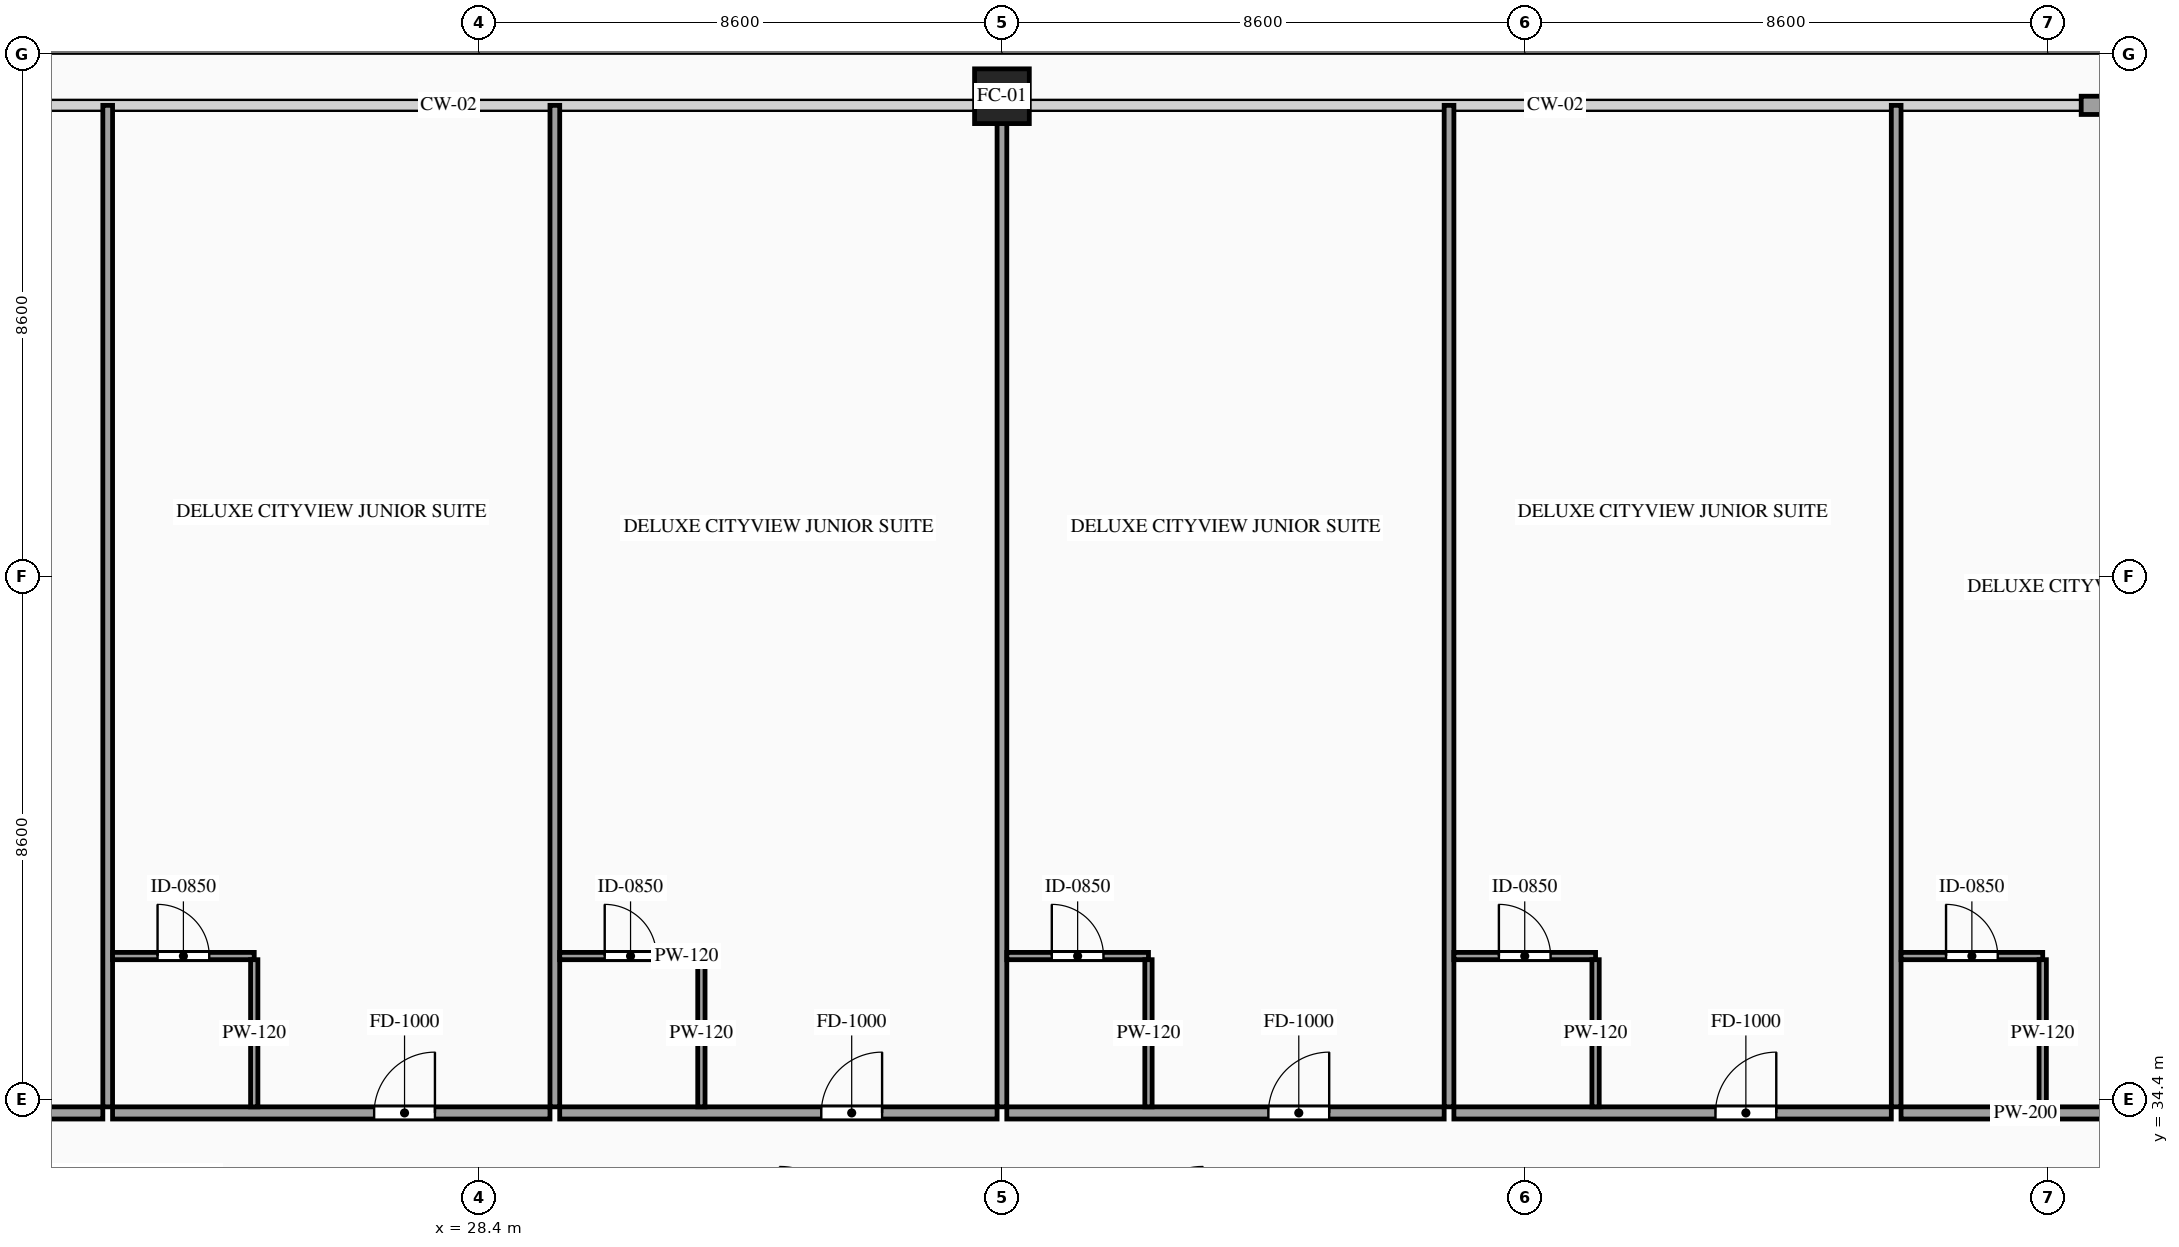
"""IFC4 building model, lengths in metres.
Left out: names, types, materials, properties, quantities, classifications, styles, units other than length and angle.
Written with IfcOpenShell. Run it as: python <this file> out.ifc"""

import sys

from ifc_helpers import new_model, si_unit, direction, frame, frame_2d, origin, origin_2d, place, context, subcontext, project, spatial, rectangle, hollow_rectangle, extrude, source, transform, mapped, element, fill, save


model = new_model("IFC4")
c1 = context("Model", 3, precision=1e-05, world=origin(), true_north=direction((0.0, 1.0)))
c2 = subcontext(c1, "Body", "Model", "MODEL_VIEW")
j1 = project(units=[si_unit("LENGTHUNIT", "METRE"), si_unit("PLANEANGLEUNIT", "RADIAN")], contexts=[c1])
p1 = place(None, origin())
s1 = spatial("IfcSite", under=j1, at=p1, CompositionType="ELEMENT")
p2 = place(p1, origin())
s2 = spatial("IfcBuilding", under=s1, at=p2, CompositionType="ELEMENT")
p3 = place(p2, frame((0.0, 0.0, 34.2)))
s3 = spatial("IfcBuildingStorey", under=s2, at=p3, CompositionType="ELEMENT", Elevation=34.2)
m1 = source(origin(), c2, "Body", "SweptSolid", [
    extrude(hollow_rectangle(XDim=0.9, YDim=0.9, WallThickness=0.042, at=origin_2d()), origin(), (0.0, 0.0, 1.0), 3.6),
])
p4 = place(p3, frame((37.0, 50.9, 0.0), z_axis=(0.0, 0.0, 1.0), x_axis=(1.0, 0.0, 0.0)))
e1 = element("IfcColumn", 1, at=p4, inside=s3, PredefinedType="COLUMN", context=c2, shape_type="MappedRepresentation", body=[
    mapped(m1, transform((0.0, 0.0, 0.0), scale=1.0)),
])
m2 = source(origin(), c2, "Body", "SweptSolid", [
    extrude(rectangle(XDim=2.85, YDim=0.3, at=frame_2d((1.425, 0.0))), origin(), (0.0, 0.0, 1.0), 2.775),
])
p5 = place(p3, frame((54.75, 50.75, 0.0), z_axis=(0.0, 0.0, 1.0), x_axis=(1.0, 0.0, 0.0)))
e2 = element("IfcWall", 2, at=p5, inside=s3, PredefinedType="SOLIDWALL", context=c2, shape_type="MappedRepresentation", body=[
    mapped(m2, transform((0.0, 0.0, 0.0), scale=1.0)),
])
p6 = place(p3, frame((14.94, 34.18, 0.0), z_axis=(0.0, 0.0, 1.0), x_axis=(1.0, 0.0, 0.0)))
e3 = element("IfcWall", 3, at=p6, inside=s3, PredefinedType="PARTITIONING", context=c2, shape_type="SweptSolid", body=[
    extrude(rectangle(XDim=7.273, YDim=0.2, at=frame_2d((3.636, 0.0))), origin(), (0.0, 0.0, 1.0), 3.38),
])
p7 = place(p6, frame((4.342, 0.0, 0.0)))
e4 = element("IfcOpeningElement", 4, at=p7, cuts=e3, PredefinedType="OPENING", context=c2, shape_type="SweptSolid", body=[
    extrude(rectangle(XDim=1.0, YDim=2.2, at=frame_2d((0.5, 1.1))), frame((0.0, 0.115, 0.0), z_axis=(0.0, -1.0, 0.0), x_axis=(1.0, 0.0, 0.0)), (0.0, 0.0, 1.0), 0.23),
])
m3 = source(origin(), c2, "Body", "SweptSolid", [
    extrude(rectangle(XDim=16.47, YDim=0.16, at=frame_2d((8.235, 0.0))), origin(), (0.0, 0.0, 1.0), 3.38),
])
p8 = place(p3, frame((22.293, 34.28, 0.0), z_axis=(0.0, 0.0, 1.0), x_axis=(0.0, 1.0, 0.0)))
e5 = element("IfcWall", 5, at=p8, inside=s3, PredefinedType="PARTITIONING", context=c2, shape_type="MappedRepresentation", body=[
    mapped(m3, transform((0.0, 0.0, 0.0), scale=1.0)),
])
p9 = place(p3, frame((22.373, 34.18, 0.0), z_axis=(0.0, 0.0, 1.0), x_axis=(1.0, 0.0, 0.0)))
e6 = element("IfcWall", 6, at=p9, inside=s3, PredefinedType="PARTITIONING", context=c2, shape_type="SweptSolid", body=[
    extrude(rectangle(XDim=7.194, YDim=0.2, at=frame_2d((3.597, 0.0))), origin(), (0.0, 0.0, 1.0), 3.38),
])
p10 = place(p9, frame((4.302, 0.0, 0.0)))
e7 = element("IfcOpeningElement", 7, at=p10, cuts=e6, PredefinedType="OPENING", context=c2, shape_type="SweptSolid", body=[
    extrude(rectangle(XDim=1.0, YDim=2.2, at=frame_2d((0.5, 1.1))), frame((0.0, 0.115, 0.0), z_axis=(0.0, -1.0, 0.0), x_axis=(1.0, 0.0, 0.0)), (0.0, 0.0, 1.0), 0.23),
])
p11 = place(p3, frame((29.647, 34.28, 0.0), z_axis=(0.0, 0.0, 1.0), x_axis=(0.0, 1.0, 0.0)))
e8 = element("IfcWall", 8, at=p11, inside=s3, PredefinedType="PARTITIONING", context=c2, shape_type="MappedRepresentation", body=[
    mapped(m3, transform((0.0, 0.0, 0.0), scale=1.0)),
])
p12 = place(p3, frame((22.373, 36.76, 0.0), z_axis=(0.0, 0.0, 1.0), x_axis=(1.0, 0.0, 0.0)))
e9 = element("IfcWall", 9, at=p12, inside=s3, PredefinedType="PARTITIONING", context=c2, shape_type="SweptSolid", body=[
    extrude(rectangle(XDim=2.33, YDim=0.12, at=frame_2d((1.165, 0.0))), origin(), (0.0, 0.0, 1.0), 3.38),
])
p13 = place(p12, frame((0.74, 0.0, 0.0)))
e10 = element("IfcOpeningElement", 10, at=p13, cuts=e9, PredefinedType="OPENING", context=c2, shape_type="SweptSolid", body=[
    extrude(rectangle(XDim=0.85, YDim=2.1, at=frame_2d((0.425, 1.05))), frame((0.0, 0.075, 0.0), z_axis=(0.0, -1.0, 0.0), x_axis=(1.0, 0.0, 0.0)), (0.0, 0.0, 1.0), 0.15),
])
m4 = source(origin(), c2, "Body", "SweptSolid", [
    extrude(rectangle(XDim=2.42, YDim=0.12, at=frame_2d((1.21, 0.0))), origin(), (0.0, 0.0, 1.0), 3.38),
])
p14 = place(p3, frame((24.703, 34.28, 0.0), z_axis=(0.0, 0.0, 1.0), x_axis=(0.0, 1.0, 0.0)))
e11 = element("IfcWall", 11, at=p14, inside=s3, PredefinedType="PARTITIONING", context=c2, shape_type="MappedRepresentation", body=[
    mapped(m4, transform((0.0, 0.0, 0.0), scale=1.0)),
])
p15 = place(p3, frame((29.727, 34.18, 0.0), z_axis=(0.0, 0.0, 1.0), x_axis=(1.0, 0.0, 0.0)))
e12 = element("IfcWall", 12, at=p15, inside=s3, PredefinedType="PARTITIONING", context=c2, shape_type="SweptSolid", body=[
    extrude(rectangle(XDim=7.193, YDim=0.2, at=frame_2d((3.596, 0.0))), origin(), (0.0, 0.0, 1.0), 3.38),
])
p16 = place(p15, frame((4.302, 0.0, 0.0)))
e13 = element("IfcOpeningElement", 13, at=p16, cuts=e12, PredefinedType="OPENING", context=c2, shape_type="SweptSolid", body=[
    extrude(rectangle(XDim=1.0, YDim=2.2, at=frame_2d((0.5, 1.1))), frame((0.0, 0.115, 0.0), z_axis=(0.0, -1.0, 0.0), x_axis=(1.0, 0.0, 0.0)), (0.0, 0.0, 1.0), 0.23),
])
m5 = source(origin(), c2, "Body", "SweptSolid", [
    extrude(rectangle(XDim=16.47, YDim=0.16, at=frame_2d((8.235, 0.0))), origin(), (0.0, 0.0, 1.0), 2.575),
])
p17 = place(p3, frame((37.0, 34.28, 0.0), z_axis=(0.0, 0.0, 1.0), x_axis=(0.0, 1.0, 0.0)))
e14 = element("IfcWall", 14, at=p17, inside=s3, PredefinedType="PARTITIONING", context=c2, shape_type="MappedRepresentation", body=[
    mapped(m5, transform((0.0, 0.0, 0.0), scale=1.0)),
])
p18 = place(p3, frame((29.727, 36.76, 0.0), z_axis=(0.0, 0.0, 1.0), x_axis=(1.0, 0.0, 0.0)))
e15 = element("IfcWall", 15, at=p18, inside=s3, PredefinedType="PARTITIONING", context=c2, shape_type="SweptSolid", body=[
    extrude(rectangle(XDim=2.33, YDim=0.12, at=frame_2d((1.165, 0.0))), origin(), (0.0, 0.0, 1.0), 3.38),
])
p19 = place(p18, frame((0.74, 0.0, 0.0)))
e16 = element("IfcOpeningElement", 16, at=p19, cuts=e15, PredefinedType="OPENING", context=c2, shape_type="SweptSolid", body=[
    extrude(rectangle(XDim=0.85, YDim=2.1, at=frame_2d((0.425, 1.05))), frame((0.0, 0.075, 0.0), z_axis=(0.0, -1.0, 0.0), x_axis=(1.0, 0.0, 0.0)), (0.0, 0.0, 1.0), 0.15),
])
p20 = place(p3, frame((32.057, 34.28, 0.0), z_axis=(0.0, 0.0, 1.0), x_axis=(0.0, 1.0, 0.0)))
e17 = element("IfcWall", 17, at=p20, inside=s3, PredefinedType="PARTITIONING", context=c2, shape_type="MappedRepresentation", body=[
    mapped(m4, transform((0.0, 0.0, 0.0), scale=1.0)),
])
p21 = place(p3, frame((37.08, 34.18, 0.0), z_axis=(0.0, 0.0, 1.0), x_axis=(1.0, 0.0, 0.0)))
e18 = element("IfcWall", 18, at=p21, inside=s3, PredefinedType="PARTITIONING", context=c2, shape_type="SweptSolid", body=[
    extrude(rectangle(XDim=7.193, YDim=0.2, at=frame_2d((3.596, 0.0))), origin(), (0.0, 0.0, 1.0), 3.38),
])
p22 = place(p21, frame((4.302, 0.0, 0.0)))
e19 = element("IfcOpeningElement", 19, at=p22, cuts=e18, PredefinedType="OPENING", context=c2, shape_type="SweptSolid", body=[
    extrude(rectangle(XDim=1.0, YDim=2.2, at=frame_2d((0.5, 1.1))), frame((0.0, 0.115, 0.0), z_axis=(0.0, -1.0, 0.0), x_axis=(1.0, 0.0, 0.0)), (0.0, 0.0, 1.0), 0.23),
])
p23 = place(p3, frame((44.353, 34.28, 0.0), z_axis=(0.0, 0.0, 1.0), x_axis=(0.0, 1.0, 0.0)))
e20 = element("IfcWall", 20, at=p23, inside=s3, PredefinedType="PARTITIONING", context=c2, shape_type="MappedRepresentation", body=[
    mapped(m3, transform((0.0, 0.0, 0.0), scale=1.0)),
])
p24 = place(p3, frame((37.08, 36.76, 0.0), z_axis=(0.0, 0.0, 1.0), x_axis=(1.0, 0.0, 0.0)))
e21 = element("IfcWall", 21, at=p24, inside=s3, PredefinedType="PARTITIONING", context=c2, shape_type="SweptSolid", body=[
    extrude(rectangle(XDim=2.33, YDim=0.12, at=frame_2d((1.165, 0.0))), origin(), (0.0, 0.0, 1.0), 3.38),
])
p25 = place(p24, frame((0.74, 0.0, 0.0)))
e22 = element("IfcOpeningElement", 22, at=p25, cuts=e21, PredefinedType="OPENING", context=c2, shape_type="SweptSolid", body=[
    extrude(rectangle(XDim=0.85, YDim=2.1, at=frame_2d((0.425, 1.05))), frame((0.0, 0.075, 0.0), z_axis=(0.0, -1.0, 0.0), x_axis=(1.0, 0.0, 0.0)), (0.0, 0.0, 1.0), 0.15),
])
p26 = place(p3, frame((39.41, 34.28, 0.0), z_axis=(0.0, 0.0, 1.0), x_axis=(0.0, 1.0, 0.0)))
e23 = element("IfcWall", 23, at=p26, inside=s3, PredefinedType="PARTITIONING", context=c2, shape_type="MappedRepresentation", body=[
    mapped(m4, transform((0.0, 0.0, 0.0), scale=1.0)),
])
p27 = place(p3, frame((44.433, 34.18, 0.0), z_axis=(0.0, 0.0, 1.0), x_axis=(1.0, 0.0, 0.0)))
e24 = element("IfcWall", 24, at=p27, inside=s3, PredefinedType="PARTITIONING", context=c2, shape_type="SweptSolid", body=[
    extrude(rectangle(XDim=7.194, YDim=0.2, at=frame_2d((3.597, 0.0))), origin(), (0.0, 0.0, 1.0), 3.38),
])
p28 = place(p27, frame((4.302, 0.0, 0.0)))
e25 = element("IfcOpeningElement", 25, at=p28, cuts=e24, PredefinedType="OPENING", context=c2, shape_type="SweptSolid", body=[
    extrude(rectangle(XDim=1.0, YDim=2.2, at=frame_2d((0.5, 1.1))), frame((0.0, 0.115, 0.0), z_axis=(0.0, -1.0, 0.0), x_axis=(1.0, 0.0, 0.0)), (0.0, 0.0, 1.0), 0.23),
])
p29 = place(p3, frame((51.707, 34.28, 0.0), z_axis=(0.0, 0.0, 1.0), x_axis=(0.0, 1.0, 0.0)))
e26 = element("IfcWall", 26, at=p29, inside=s3, PredefinedType="PARTITIONING", context=c2, shape_type="MappedRepresentation", body=[
    mapped(m3, transform((0.0, 0.0, 0.0), scale=1.0)),
])
p30 = place(p3, frame((44.433, 36.76, 0.0), z_axis=(0.0, 0.0, 1.0), x_axis=(1.0, 0.0, 0.0)))
e27 = element("IfcWall", 27, at=p30, inside=s3, PredefinedType="PARTITIONING", context=c2, shape_type="SweptSolid", body=[
    extrude(rectangle(XDim=2.33, YDim=0.12, at=frame_2d((1.165, 0.0))), origin(), (0.0, 0.0, 1.0), 3.38),
])
p31 = place(p30, frame((0.74, 0.0, 0.0)))
e28 = element("IfcOpeningElement", 28, at=p31, cuts=e27, PredefinedType="OPENING", context=c2, shape_type="SweptSolid", body=[
    extrude(rectangle(XDim=0.85, YDim=2.1, at=frame_2d((0.425, 1.05))), frame((0.0, 0.075, 0.0), z_axis=(0.0, -1.0, 0.0), x_axis=(1.0, 0.0, 0.0)), (0.0, 0.0, 1.0), 0.15),
])
p32 = place(p3, frame((46.763, 34.28, 0.0), z_axis=(0.0, 0.0, 1.0), x_axis=(0.0, 1.0, 0.0)))
e29 = element("IfcWall", 29, at=p32, inside=s3, PredefinedType="PARTITIONING", context=c2, shape_type="MappedRepresentation", body=[
    mapped(m4, transform((0.0, 0.0, 0.0), scale=1.0)),
])
p33 = place(p3, frame((51.787, 34.18, 0.0), z_axis=(0.0, 0.0, 1.0), x_axis=(1.0, 0.0, 0.0)))
e30 = element("IfcWall", 30, at=p33, inside=s3, PredefinedType="PARTITIONING", context=c2, shape_type="SweptSolid", body=[
    extrude(rectangle(XDim=7.273, YDim=0.2, at=frame_2d((3.636, 0.0))), origin(), (0.0, 0.0, 1.0), 3.38),
])
p34 = place(p33, frame((4.342, 0.0, 0.0)))
e31 = element("IfcOpeningElement", 31, at=p34, cuts=e30, PredefinedType="OPENING", context=c2, shape_type="SweptSolid", body=[
    extrude(rectangle(XDim=1.0, YDim=2.2, at=frame_2d((0.5, 1.1))), frame((0.0, 0.115, 0.0), z_axis=(0.0, -1.0, 0.0), x_axis=(1.0, 0.0, 0.0)), (0.0, 0.0, 1.0), 0.23),
])
p35 = place(p3, frame((51.787, 36.76, 0.0), z_axis=(0.0, 0.0, 1.0), x_axis=(1.0, 0.0, 0.0)))
e32 = element("IfcWall", 32, at=p35, inside=s3, PredefinedType="PARTITIONING", context=c2, shape_type="SweptSolid", body=[
    extrude(rectangle(XDim=2.33, YDim=0.12, at=frame_2d((1.165, 0.0))), origin(), (0.0, 0.0, 1.0), 3.38),
])
p36 = place(p35, frame((0.74, 0.0, 0.0)))
e33 = element("IfcOpeningElement", 33, at=p36, cuts=e32, PredefinedType="OPENING", context=c2, shape_type="SweptSolid", body=[
    extrude(rectangle(XDim=0.85, YDim=2.1, at=frame_2d((0.425, 1.05))), frame((0.0, 0.075, 0.0), z_axis=(0.0, -1.0, 0.0), x_axis=(1.0, 0.0, 0.0)), (0.0, 0.0, 1.0), 0.15),
])
p37 = place(p3, frame((54.117, 34.28, 0.0), z_axis=(0.0, 0.0, 1.0), x_axis=(0.0, 1.0, 0.0)))
e34 = element("IfcWall", 34, at=p37, inside=s3, PredefinedType="PARTITIONING", context=c2, shape_type="MappedRepresentation", body=[
    mapped(m4, transform((0.0, 0.0, 0.0), scale=1.0)),
])
m6 = source(origin(), c2, "Body", "SweptSolid", [
    extrude(rectangle(XDim=1.0, YDim=2.2, at=frame_2d((0.5, 1.1))), frame((0.0, 0.025, 0.0), z_axis=(0.0, -1.0, 0.0), x_axis=(1.0, 0.0, 0.0)), (0.0, 0.0, 1.0), 0.05),
])
p38 = place(p10, origin())
e35 = element("IfcDoor", 35, at=p38, inside=s3, OperationType="SINGLE_SWING_RIGHT", PredefinedType="DOOR", context=c2, shape_type="MappedRepresentation", body=[
    mapped(m6, transform((0.0, 0.0, 0.0), scale=1.0)),
])
fill(e7, e35)
m7 = source(origin(), c2, "Body", "SweptSolid", [
    extrude(rectangle(XDim=0.85, YDim=2.1, at=frame_2d((0.425, 1.05))), frame((0.0, 0.025, 0.0), z_axis=(0.0, -1.0, 0.0), x_axis=(1.0, 0.0, 0.0)), (0.0, 0.0, 1.0), 0.05),
])
p39 = place(p13, origin())
e36 = element("IfcDoor", 36, at=p39, inside=s3, OperationType="SINGLE_SWING_LEFT", PredefinedType="DOOR", context=c2, shape_type="MappedRepresentation", body=[
    mapped(m7, transform((0.0, 0.0, 0.0), scale=1.0)),
])
fill(e10, e36)
p40 = place(p16, origin())
e37 = element("IfcDoor", 37, at=p40, inside=s3, OperationType="SINGLE_SWING_RIGHT", PredefinedType="DOOR", context=c2, shape_type="MappedRepresentation", body=[
    mapped(m6, transform((0.0, 0.0, 0.0), scale=1.0)),
])
fill(e13, e37)
p41 = place(p19, origin())
e38 = element("IfcDoor", 38, at=p41, inside=s3, OperationType="SINGLE_SWING_LEFT", PredefinedType="DOOR", context=c2, shape_type="MappedRepresentation", body=[
    mapped(m7, transform((0.0, 0.0, 0.0), scale=1.0)),
])
fill(e16, e38)
p42 = place(p22, origin())
e39 = element("IfcDoor", 39, at=p42, inside=s3, OperationType="SINGLE_SWING_RIGHT", PredefinedType="DOOR", context=c2, shape_type="MappedRepresentation", body=[
    mapped(m6, transform((0.0, 0.0, 0.0), scale=1.0)),
])
fill(e19, e39)
p43 = place(p25, origin())
e40 = element("IfcDoor", 40, at=p43, inside=s3, OperationType="SINGLE_SWING_LEFT", PredefinedType="DOOR", context=c2, shape_type="MappedRepresentation", body=[
    mapped(m7, transform((0.0, 0.0, 0.0), scale=1.0)),
])
fill(e22, e40)
p44 = place(p28, origin())
e41 = element("IfcDoor", 41, at=p44, inside=s3, OperationType="SINGLE_SWING_RIGHT", PredefinedType="DOOR", context=c2, shape_type="MappedRepresentation", body=[
    mapped(m6, transform((0.0, 0.0, 0.0), scale=1.0)),
])
fill(e25, e41)
p45 = place(p31, origin())
e42 = element("IfcDoor", 42, at=p45, inside=s3, OperationType="SINGLE_SWING_LEFT", PredefinedType="DOOR", context=c2, shape_type="MappedRepresentation", body=[
    mapped(m7, transform((0.0, 0.0, 0.0), scale=1.0)),
])
fill(e28, e42)
p46 = place(p36, origin())
e43 = element("IfcDoor", 43, at=p46, inside=s3, OperationType="SINGLE_SWING_LEFT", PredefinedType="DOOR", context=c2, shape_type="MappedRepresentation", body=[
    mapped(m7, transform((0.0, 0.0, 0.0), scale=1.0)),
])
fill(e33, e43)
save(model, sys.argv[1])
